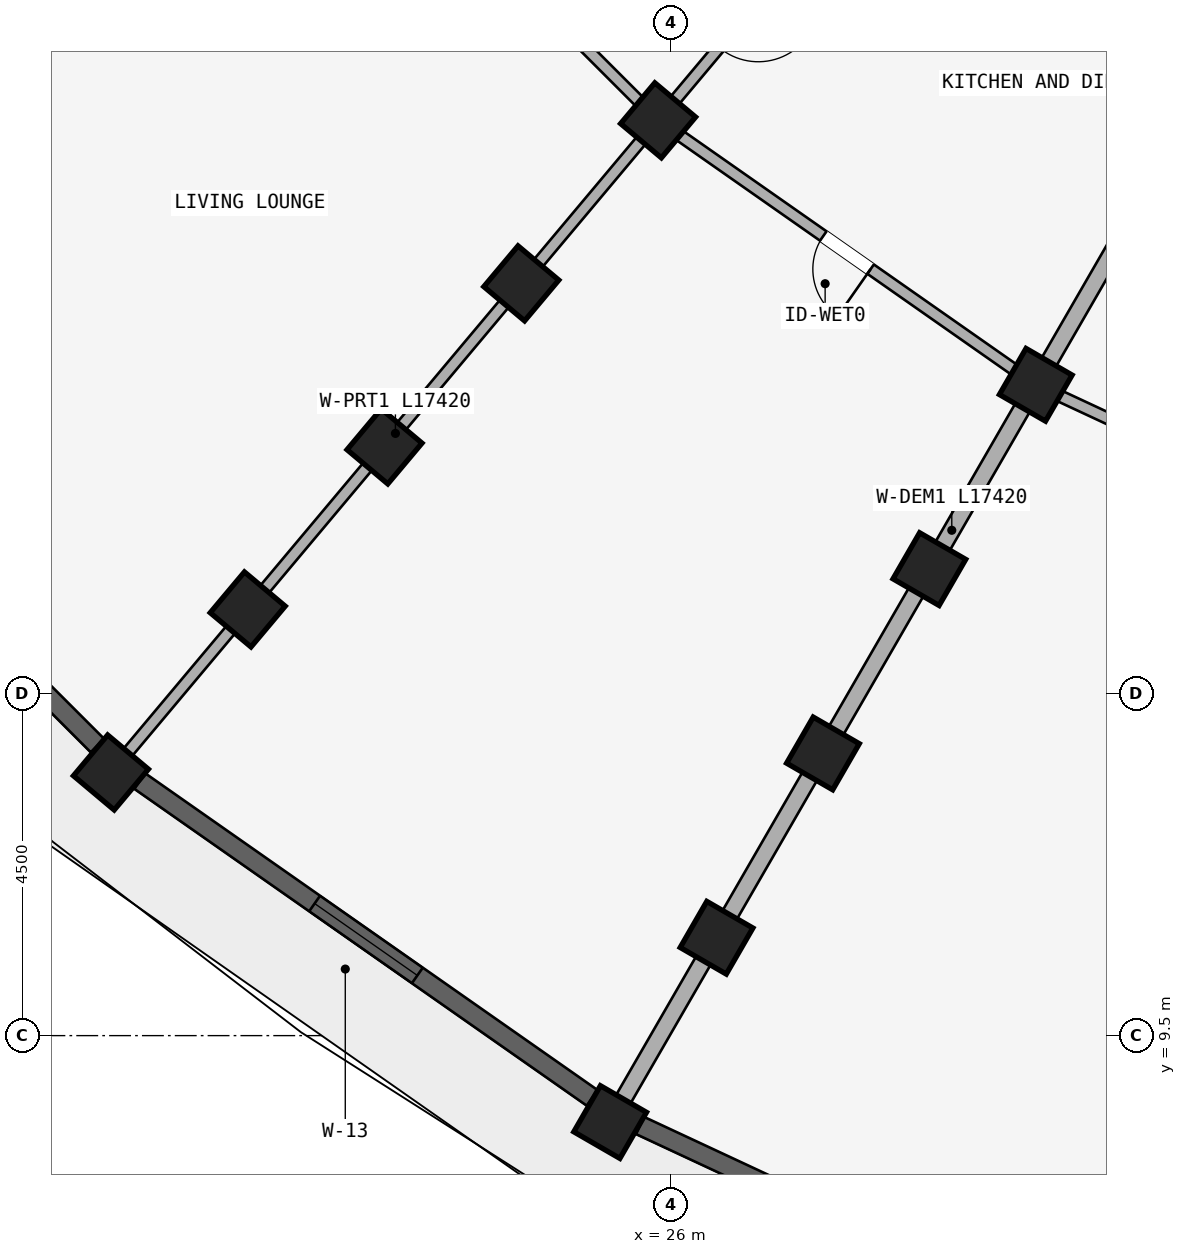
"""IFC4 building model, lengths in metres.
Left out: names, types, materials, properties, quantities, classifications, styles, units other than length and angle.
Written with IfcOpenShell. Run it as: python <this file> out.ifc"""

import sys

from ifc_helpers import new_model, si_unit, direction, frame, frame_2d, origin, origin_2d, place, context, subcontext, project, spatial, rectangle, extrude, element, fill, save


model = new_model("IFC4")
c1 = context("Model", 3, precision=1e-05, world=origin(), true_north=direction((0.0, 1.0)))
c2 = subcontext(c1, "Body", "Model", "MODEL_VIEW")
j1 = project(units=[si_unit("LENGTHUNIT", "METRE"), si_unit("PLANEANGLEUNIT", "RADIAN")], contexts=[c1])
p1 = place(None, origin())
s1 = spatial("IfcSite", under=j1, at=p1, CompositionType="ELEMENT")
p2 = place(p1, origin())
s2 = spatial("IfcBuilding", under=s1, at=p2, CompositionType="ELEMENT")
p3 = place(p2, frame((0.0, 0.0, 18.15)))
s3 = spatial("IfcBuildingStorey", under=s2, at=p3, CompositionType="ELEMENT", Elevation=18.15)
for number, where, z_axis, x_axis in (
    (1, (30.8, 18.062, 0.0), (0.0, 0.0, 1.0), (-0.866, 0.5, 0.0)),
    (2, (29.4, 15.637, 0.0), (0.0, 0.0, 1.0), (-0.866, 0.5, 0.0)),
    (3, (28.0, 13.213, 0.0), (0.0, 0.0, 1.0), (-0.866, 0.5, 0.0)),
    (4, (26.6, 10.788, 0.0), (0.0, 0.0, 1.0), (-0.866, 0.5, 0.0)),
):
    element("IfcColumn", number, at=place(p3, frame(where, z_axis=z_axis, x_axis=x_axis)), inside=s3, PredefinedType="COLUMN", context=c2, shape_type="SweptSolid", body=[
        extrude(rectangle(XDim=0.7, YDim=0.7, at=origin_2d()), origin(), (0.0, 0.0, 1.0), 2.93),
    ])
p4 = place(p3, frame((25.2, 8.363, 0.0), z_axis=(0.0, 0.0, 1.0), x_axis=(-0.866025403784, 0.5, 0.0)))
e5 = element("IfcColumn", 5, at=p4, inside=s3, PredefinedType="COLUMN", context=c2, shape_type="SweptSolid", body=[
    extrude(rectangle(XDim=0.7, YDim=0.7, at=origin_2d()), origin(), (0.0, 0.0, 1.0), 2.97),
])
for number, where, z_axis, x_axis in (
    (6, (25.831, 21.542, 0.0), (0.0, 0.0, 1.0), (-0.766, 0.643, 0.0)),
    (7, (24.031, 19.397, 0.0), (0.0, 0.0, 1.0), (-0.766, 0.643, 0.0)),
    (8, (22.231, 17.252, 0.0), (0.0, 0.0, 1.0), (-0.766, 0.643, 0.0)),
    (9, (20.432, 15.107, 0.0), (0.0, 0.0, 1.0), (-0.766, 0.643, 0.0)),
):
    element("IfcColumn", number, at=place(p3, frame(where, z_axis=z_axis, x_axis=x_axis)), inside=s3, PredefinedType="COLUMN", context=c2, shape_type="SweptSolid", body=[
        extrude(rectangle(XDim=0.7, YDim=0.7, at=origin_2d()), origin(), (0.0, 0.0, 1.0), 2.93),
    ])
p5 = place(p3, frame((18.632, 12.962, 0.0), z_axis=(0.0, 0.0, 1.0), x_axis=(-0.766044443119, 0.642787609687, 0.0)))
e10 = element("IfcColumn", 10, at=p5, inside=s3, PredefinedType="COLUMN", context=c2, shape_type="SweptSolid", body=[
    extrude(rectangle(XDim=0.7, YDim=0.7, at=origin_2d()), origin(), (0.0, 0.0, 1.0), 2.97),
])
p6 = place(p3, frame((34.05, 23.691, 0.0), z_axis=(0.0, 0.0, 1.0), x_axis=(-0.499997843263, -0.866026648973, 0.0)))
e11 = element("IfcWall", 11, at=p6, inside=s3, PredefinedType="STANDARD", context=c2, shape_type="SweptSolid", body=[
    extrude(rectangle(XDim=17.42, YDim=0.22, at=frame_2d((8.71, 0.0))), origin(), (0.0, 0.0, 1.0), 2.372),
])
p7 = place(p3, frame((30.009, 26.521, 0.0), z_axis=(0.0, 0.0, 1.0), x_axis=(-0.642784757967, -0.766046835987, 0.0)))
e12 = element("IfcWall", 12, at=p7, inside=s3, PredefinedType="PARTITIONING", context=c2, shape_type="SweptSolid", body=[
    extrude(rectangle(XDim=17.42, YDim=0.15, at=frame_2d((8.71, 0.0))), origin(), (0.0, 0.0, 1.0), 2.372),
])
p8 = place(p7, frame((4.45, 0.0, 0.0)))
e13 = element("IfcOpeningElement", 13, at=p8, cuts=e12, PredefinedType="OPENING", context=c2, shape_type="SweptSolid", body=[
    extrude(rectangle(XDim=0.8, YDim=2.1, at=frame_2d((0.4, 1.05))), frame((0.0, 0.085, 0.0), z_axis=(0.0, -1.0, 0.0), x_axis=(1.0, 0.0, 0.0)), (0.0, 0.0, 1.0), 0.17),
])
p9 = place(p3, frame((26.521, 30.009, 0.0), z_axis=(0.0, 0.0, 1.0), x_axis=(-0.766046835987, -0.642784757967, 0.0)))
e14 = element("IfcWall", 14, at=p9, inside=s3, PredefinedType="STANDARD", context=c2, shape_type="SweptSolid", body=[
    extrude(rectangle(XDim=17.42, YDim=0.22, at=frame_2d((8.71, 0.0))), origin(), (0.0, 0.0, 1.0), 2.372),
])
p10 = place(p3, frame((36.298, 15.499, 0.0), z_axis=(0.0, 0.0, 1.0), x_axis=(-0.906312656069, 0.42260781991, 0.0)))
e15 = element("IfcWall", 15, at=p10, inside=s3, PredefinedType="PLUMBINGWALL", context=c2, shape_type="SweptSolid", body=[
    extrude(rectangle(XDim=6.066, YDim=0.15, at=frame_2d((3.033, 0.0))), origin(), (0.0, 0.0, 1.0), 2.372),
])
p11 = place(p10, frame((2.613, 0.0, 0.0)))
e16 = element("IfcOpeningElement", 16, at=p11, cuts=e15, PredefinedType="OPENING", context=c2, shape_type="SweptSolid", body=[
    extrude(rectangle(XDim=0.84, YDim=2.1, at=frame_2d((0.42, 1.05))), frame((0.0, 0.085, 0.0), z_axis=(0.0, -1.0, 0.0), x_axis=(1.0, 0.0, 0.0)), (0.0, 0.0, 1.0), 0.17),
])
p12 = place(p3, frame((30.8, 18.062, 0.0), z_axis=(0.0, 0.0, 1.0), x_axis=(-0.81913926159, 0.573594691504, 0.0)))
e17 = element("IfcWall", 17, at=p12, inside=s3, PredefinedType="PLUMBINGWALL", context=c2, shape_type="SweptSolid", body=[
    extrude(rectangle(XDim=6.066, YDim=0.15, at=frame_2d((3.033, 0.0))), origin(), (0.0, 0.0, 1.0), 2.372),
])
p13 = place(p12, frame((2.653, 0.0, 0.0)))
e18 = element("IfcOpeningElement", 18, at=p13, cuts=e17, PredefinedType="OPENING", context=c2, shape_type="SweptSolid", body=[
    extrude(rectangle(XDim=0.76, YDim=2.05, at=frame_2d((0.38, 1.025))), frame((0.0, 0.085, 0.0), z_axis=(0.0, -1.0, 0.0), x_axis=(1.0, 0.0, 0.0)), (0.0, 0.0, 1.0), 0.17),
])
p14 = place(p3, frame((25.831, 21.542, 0.0), z_axis=(0.0, 0.0, 1.0), x_axis=(-0.707106781187, 0.707106781187, 0.0)))
e19 = element("IfcWall", 19, at=p14, inside=s3, PredefinedType="PLUMBINGWALL", context=c2, shape_type="SweptSolid", body=[
    extrude(rectangle(XDim=6.066, YDim=0.15, at=frame_2d((3.033, 0.0))), origin(), (0.0, 0.0, 1.0), 2.372),
])
p15 = place(p14, frame((2.633, 0.0, 0.0)))
e20 = element("IfcOpeningElement", 20, at=p15, cuts=e19, PredefinedType="OPENING", context=c2, shape_type="SweptSolid", body=[
    extrude(rectangle(XDim=0.8, YDim=2.1, at=frame_2d((0.4, 1.05))), frame((0.0, 0.085, 0.0), z_axis=(0.0, -1.0, 0.0), x_axis=(1.0, 0.0, 0.0)), (0.0, 0.0, 1.0), 0.17),
])
p16 = place(p3, frame((32.179, 5.246, 0.0), z_axis=(0.0, 0.0, 1.0), x_axis=(-0.90630327107, 0.422627946127, 0.0)))
e21 = element("IfcWall", 21, at=p16, inside=s3, PredefinedType="STANDARD", context=c2, shape_type="SweptSolid", body=[
    extrude(rectangle(XDim=7.267, YDim=0.25, at=frame_2d((3.633, 0.0))), origin(), (0.0, 0.0, 1.0), 2.412),
])
p17 = place(p16, frame((2.733, 0.0, 0.562)))
e22 = element("IfcOpeningElement", 22, at=p17, cuts=e21, PredefinedType="OPENING", context=c2, shape_type="SweptSolid", body=[
    extrude(rectangle(XDim=1.8, YDim=1.65, at=frame_2d((0.9, 0.825))), frame((0.0, 0.135, 0.0), z_axis=(0.0, -1.0, 0.0), x_axis=(1.0, 0.0, 0.0)), (0.0, 0.0, 1.0), 0.27),
])
p18 = place(p3, frame((24.964, 8.681, 0.0), z_axis=(0.0, 0.0, 1.0), x_axis=(-0.819159308599, 0.573566061701, 0.0)))
e23 = element("IfcWall", 23, at=p18, inside=s3, PredefinedType="STANDARD", context=c2, shape_type="SweptSolid", body=[
    extrude(rectangle(XDim=7.267, YDim=0.25, at=frame_2d((3.633, 0.0))), origin(), (0.0, 0.0, 1.0), 2.412),
])
p19 = place(p18, frame((2.808, 0.0, 0.462)))
e24 = element("IfcOpeningElement", 24, at=p19, cuts=e23, PredefinedType="OPENING", context=c2, shape_type="SweptSolid", body=[
    extrude(rectangle(XDim=1.65, YDim=1.75, at=frame_2d((0.825, 0.875))), frame((0.0, 0.135, 0.0), z_axis=(0.0, -1.0, 0.0), x_axis=(1.0, 0.0, 0.0)), (0.0, 0.0, 1.0), 0.27),
])
p20 = place(p3, frame((18.454, 13.316, 0.0), z_axis=(0.0, 0.0, 1.0), x_axis=(-0.707106781187, 0.707106781187, 0.0)))
e25 = element("IfcWall", 25, at=p20, inside=s3, PredefinedType="STANDARD", context=c2, shape_type="SweptSolid", body=[
    extrude(rectangle(XDim=7.267, YDim=0.25, at=frame_2d((3.633, 0.0))), origin(), (0.0, 0.0, 1.0), 2.412),
])
p21 = place(p20, frame((4.766, 0.0, 0.562)))
e26 = element("IfcOpeningElement", 26, at=p21, cuts=e25, PredefinedType="OPENING", context=c2, shape_type="SweptSolid", body=[
    extrude(rectangle(XDim=1.2, YDim=1.5, at=frame_2d((0.6, 0.75))), frame((0.0, 0.135, 0.0), z_axis=(0.0, -1.0, 0.0), x_axis=(1.0, 0.0, 0.0)), (0.0, 0.0, 1.0), 0.27),
])
p22 = place(p20, frame((1.883, 0.0, 0.0)))
e27 = element("IfcOpeningElement", 27, at=p22, cuts=e25, PredefinedType="OPENING", context=c2, shape_type="SweptSolid", body=[
    extrude(rectangle(XDim=1.32, YDim=2.15, at=frame_2d((0.66, 1.075))), frame((0.0, 0.135, 0.0), z_axis=(0.0, -1.0, 0.0), x_axis=(1.0, 0.0, 0.0)), (0.0, 0.0, 1.0), 0.27),
])
p23 = place(p19, origin())
e28 = element("IfcWindow", 28, at=p23, inside=s3, PartitioningType="DOUBLE_PANEL_VERTICAL", PredefinedType="WINDOW", context=c2, shape_type="SweptSolid", body=[
    extrude(rectangle(XDim=1.65, YDim=1.75, at=frame_2d((0.825, 0.875))), frame((0.0, 0.03, 0.0), z_axis=(0.0, -1.0, 0.0), x_axis=(1.0, 0.0, 0.0)), (0.0, 0.0, 1.0), 0.06),
])
fill(e24, e28)
p24 = place(p13, frame((0.76, 0.0, 0.0), z_axis=(0.0, 0.0, 1.0), x_axis=(-1.0, 0.0, 0.0)))
e29 = element("IfcDoor", 29, at=p24, inside=s3, OperationType="SINGLE_SWING_RIGHT", PredefinedType="DOOR", context=c2, shape_type="SweptSolid", body=[
    extrude(rectangle(XDim=0.76, YDim=2.05, at=frame_2d((0.38, 1.025))), frame((0.0, 0.025, 0.0), z_axis=(0.0, -1.0, 0.0), x_axis=(1.0, 0.0, 0.0)), (0.0, 0.0, 1.0), 0.05),
])
fill(e18, e29)
save(model, sys.argv[1])
